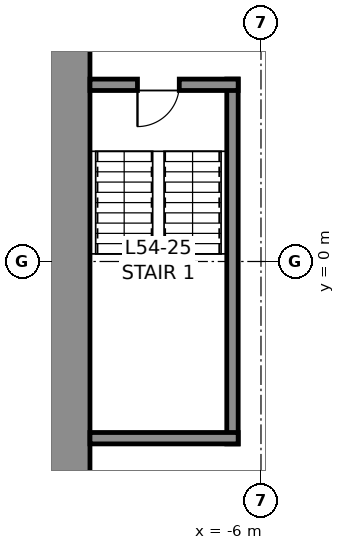
"""IFC4 building model, lengths in metres.
Left out: names, types, materials, properties, quantities, classifications, styles, units other than length and angle.
Written with IfcOpenShell. Run it as: python <this file> out.ifc"""

import sys

from ifc_helpers import new_model, si_unit, direction, frame, frame_2d, origin, place, context, subcontext, project, spatial, rectangle, extrude, element, fill, save


model = new_model("IFC4")
c1 = context("Model", 3, precision=1e-05, world=origin(), true_north=direction((0.0, 1.0)))
c2 = subcontext(c1, "Body", "Model", "MODEL_VIEW")
j1 = project(units=[si_unit("LENGTHUNIT", "METRE"), si_unit("PLANEANGLEUNIT", "RADIAN")], contexts=[c1])
p1 = place(None, origin())
s1 = spatial("IfcSite", under=j1, at=p1, CompositionType="ELEMENT")
p2 = place(p1, origin())
s2 = spatial("IfcBuilding", under=s1, at=p2, CompositionType="ELEMENT")
p3 = place(p2, frame((0.0, 0.0, 245.8)))
s3 = spatial("IfcBuildingStorey", under=s2, at=p3, CompositionType="ELEMENT", Elevation=245.8)
p4 = place(p3, frame((-11.25, -10.5, 0.0), z_axis=(0.0, 0.0, 1.0), x_axis=(0.0, 1.0, 0.0)))
e1 = element("IfcWall", 1, at=p4, inside=s3, PredefinedType="SHEAR", context=c2, shape_type="SweptSolid", body=[
    extrude(rectangle(XDim=21.0, YDim=1.5, at=frame_2d((10.5, 0.0))), origin(), (0.0, 0.0, 1.0), 4.0),
])
p5 = place(p4, frame((16.1, 0.0, 0.0)))
e2 = element("IfcOpeningElement", 2, at=p5, cuts=e1, PredefinedType="OPENING", context=c2, shape_type="SweptSolid", body=[
    extrude(rectangle(XDim=1.2, YDim=2.3, at=frame_2d((0.6, 1.15))), frame((0.0, 0.76, 0.0), z_axis=(0.0, -1.0, 0.0), x_axis=(1.0, 0.0, 0.0)), (0.0, 0.0, 1.0), 1.52),
])
p6 = place(p4, frame((3.7, 0.0, 0.0)))
e3 = element("IfcOpeningElement", 3, at=p6, cuts=e1, PredefinedType="OPENING", context=c2, shape_type="SweptSolid", body=[
    extrude(rectangle(XDim=1.2, YDim=2.3, at=frame_2d((0.6, 1.15))), frame((0.0, 0.76, 0.0), z_axis=(0.0, -1.0, 0.0), x_axis=(1.0, 0.0, 0.0)), (0.0, 0.0, 1.0), 1.52),
])
p7 = place(p3, frame((-6.75, -4.8, 0.0), z_axis=(0.0, 0.0, 1.0), x_axis=(0.0, 1.0, 0.0)))
e4 = element("IfcWall", 4, at=p7, inside=s3, PredefinedType="SOLIDWALL", context=c2, shape_type="SweptSolid", body=[
    extrude(rectangle(XDim=9.6, YDim=0.3, at=frame_2d((4.8, 0.0))), origin(), (0.0, 0.0, 1.0), 3.75),
])
p8 = place(p3, frame((-10.5, 4.65, 0.0), z_axis=(0.0, 0.0, 1.0), x_axis=(1.0, 0.0, 0.0)))
e5 = element("IfcWall", 5, at=p8, inside=s3, PredefinedType="SOLIDWALL", context=c2, shape_type="SweptSolid", body=[
    extrude(rectangle(XDim=3.9, YDim=0.3, at=frame_2d((1.95, 0.0))), origin(), (0.0, 0.0, 1.0), 3.75),
])
p9 = place(p8, frame((1.25, 0.0, 0.0)))
e6 = element("IfcOpeningElement", 6, at=p9, cuts=e5, PredefinedType="OPENING", context=c2, shape_type="SweptSolid", body=[
    extrude(rectangle(XDim=1.1, YDim=2.3, at=frame_2d((0.55, 1.15))), frame((0.0, 0.16, 0.0), z_axis=(0.0, -1.0, 0.0), x_axis=(1.0, 0.0, 0.0)), (0.0, 0.0, 1.0), 0.32),
])
p10 = place(p3, frame((-6.6, -4.65, 0.0), z_axis=(0.0, 0.0, 1.0), x_axis=(-1.0, 0.0, 0.0)))
e7 = element("IfcWall", 7, at=p10, inside=s3, PredefinedType="SOLIDWALL", context=c2, shape_type="SweptSolid", body=[
    extrude(rectangle(XDim=3.9, YDim=0.3, at=frame_2d((1.95, 0.0))), origin(), (0.0, 0.0, 1.0), 3.75),
])
p11 = place(p9, frame((1.1, 0.0, 0.0), z_axis=(0.0, 0.0, 1.0), x_axis=(-1.0, 0.0, 0.0)))
e8 = element("IfcDoor", 8, at=p11, inside=s3, OperationType="SINGLE_SWING_RIGHT", PredefinedType="DOOR", context=c2, shape_type="SweptSolid", body=[
    extrude(rectangle(XDim=1.1, YDim=2.3, at=frame_2d((0.55, 1.15))), frame((0.0, 0.025, 0.0), z_axis=(0.0, -1.0, 0.0), x_axis=(1.0, 0.0, 0.0)), (0.0, 0.0, 1.0), 0.05),
])
fill(e6, e8)
save(model, sys.argv[1])
